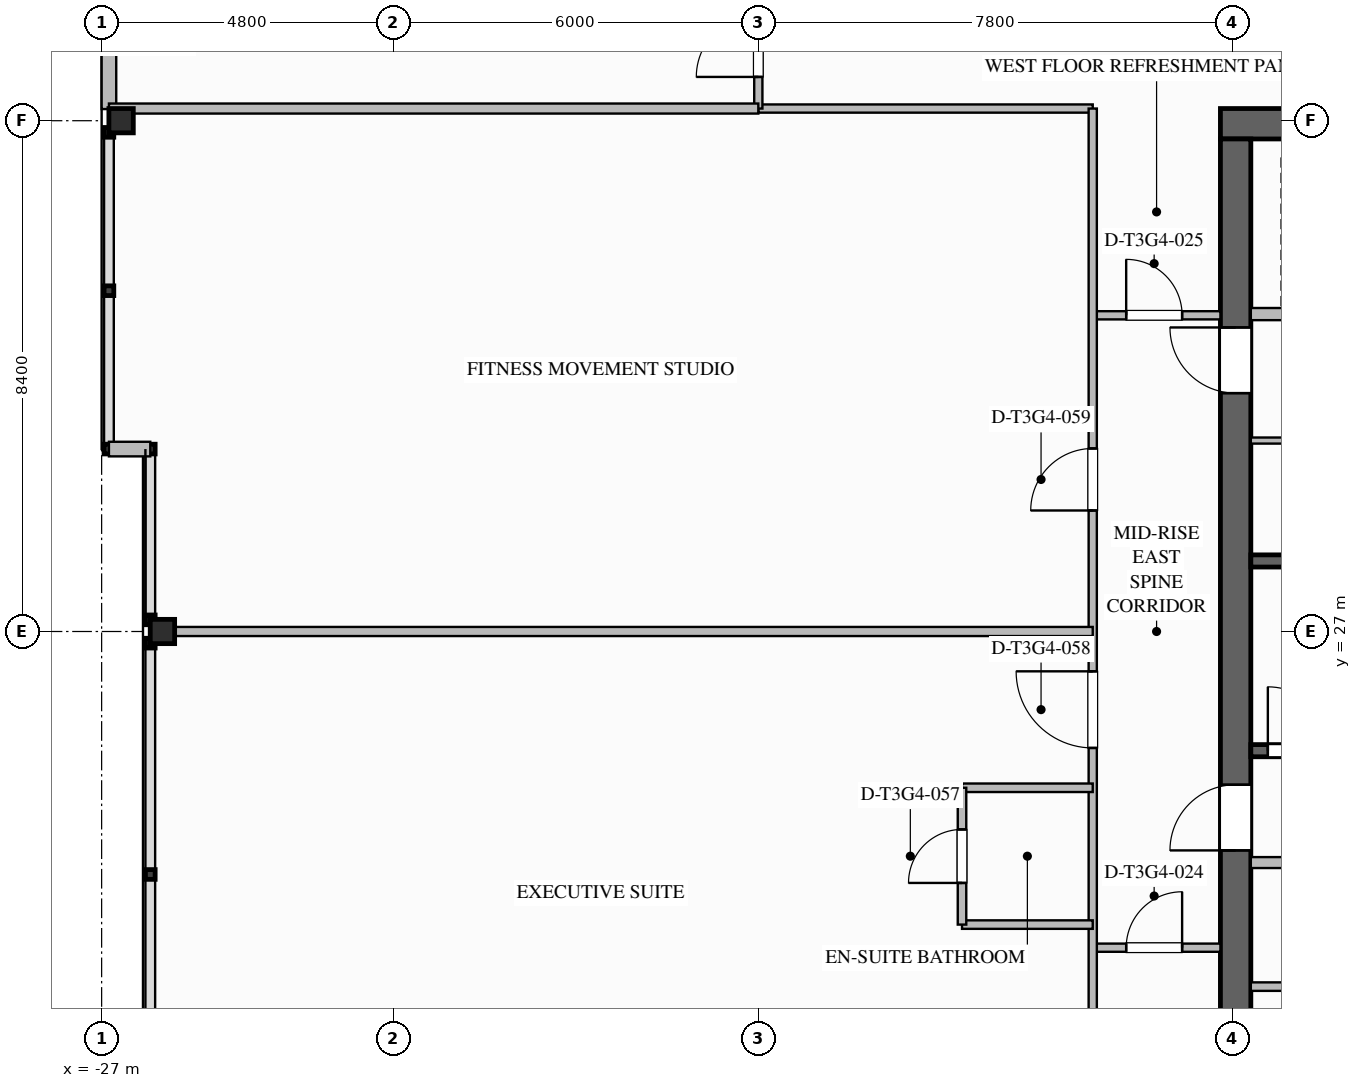
"""IFC4 building model, lengths in metres.
Left out: names, types, materials, properties, quantities, classifications, styles, units other than length and angle.
Written with IfcOpenShell. Run it as: python <this file> out.ifc"""

import sys

from ifc_helpers import new_model, si_unit, direction, frame, frame_2d, origin, origin_2d, place, context, subcontext, project, spatial, rectangle, i_section, extrude, element, fill, save


model = new_model("IFC4")
c1 = context("Model", 3, precision=1e-05, world=origin(), true_north=direction((0.0, 1.0)))
c2 = subcontext(c1, "Body", "Model", "MODEL_VIEW")
j1 = project(units=[si_unit("LENGTHUNIT", "METRE"), si_unit("PLANEANGLEUNIT", "RADIAN")], contexts=[c1])
p1 = place(None, origin())
s1 = spatial("IfcSite", under=j1, at=p1, CompositionType="ELEMENT")
p2 = place(p1, origin())
s2 = spatial("IfcBuilding", under=s1, at=p2, CompositionType="ELEMENT")
p3 = place(p2, frame((0.0, 0.0, 182.35)))
s3 = spatial("IfcBuildingStorey", under=s2, at=p3, CompositionType="ELEMENT", Elevation=182.35)
p4 = place(p3, frame((-8.6, 35.35, 0.0), z_axis=(0.0, 0.0, 1.0), x_axis=(1.0, 0.0, 0.0)))
e1 = element("IfcWall", 1, at=p4, inside=s3, PredefinedType="SHEAR", context=c2, shape_type="SweptSolid", body=[
    extrude(rectangle(XDim=17.2, YDim=0.5, at=frame_2d((8.6, 0.0))), origin(), (0.0, 0.0, 1.0), 3.55),
])
p5 = place(p3, frame((-8.35, 18.9, 0.0), z_axis=(0.0, 0.0, 1.0), x_axis=(0.0, 1.0, 0.0)))
e2 = element("IfcWall", 2, at=p5, inside=s3, PredefinedType="SHEAR", context=c2, shape_type="SweptSolid", body=[
    extrude(rectangle(XDim=16.2, YDim=0.5, at=frame_2d((8.1, 0.0))), origin(), (0.0, 0.0, 1.0), 3.55),
])
p6 = place(p5, frame((12.02, 0.0, 0.0)))
e3 = element("IfcOpeningElement", 3, at=p6, cuts=e2, PredefinedType="OPENING", context=c2, shape_type="SweptSolid", body=[
    extrude(rectangle(XDim=1.08, YDim=2.04, at=frame_2d((0.54, 1.02))), frame((0.0, 0.26, 0.0), z_axis=(0.0, -1.0, 0.0), x_axis=(1.0, 0.0, 0.0)), (0.0, 0.0, 1.0), 0.52),
])
p7 = place(p5, frame((4.5, 0.0, 0.0)))
e4 = element("IfcOpeningElement", 4, at=p7, cuts=e2, PredefinedType="OPENING", context=c2, shape_type="SweptSolid", body=[
    extrude(rectangle(XDim=1.08, YDim=2.04, at=frame_2d((0.54, 1.02))), frame((0.0, 0.26, 0.0), z_axis=(0.0, -1.0, 0.0), x_axis=(1.0, 0.0, 0.0)), (0.0, 0.0, 1.0), 0.52),
])
for number, where, z_axis, x_axis in (
    (5, (-26.0, 27.0, 0.0), (0.0, 0.0, 1.0), (1.0, 0.0, 0.0)),
    (6, (-26.68, 35.4, 0.0), (0.0, 0.0, 1.0), (1.0, 0.0, 0.0)),
):
    element("IfcColumn", number, at=place(p3, frame(where, z_axis=z_axis, x_axis=x_axis)), inside=s3, PredefinedType="COLUMN", context=c2, shape_type="SweptSolid", body=[
        extrude(i_section(OverallWidth=0.401, OverallDepth=0.399, WebThickness=0.025, FlangeThickness=0.04, FilletRadius=0.025, at=origin_2d()), origin(), (0.0, 0.0, 1.0), 3.547),
    ])
p8 = place(p3, frame((-26.88, 35.592, 0.0), z_axis=(0.0, 0.0, 1.0), x_axis=(0.0, 1.0, 0.0)))
e7 = element("IfcWall", 7, at=p8, inside=s3, PredefinedType="STANDARD", context=c2, shape_type="SweptSolid", body=[
    extrude(rectangle(XDim=7.417, YDim=0.24, at=frame_2d((3.708, 0.0))), origin(), (0.0, 0.0, 1.0), 2.753),
])
p9 = place(p8, frame((4.608, 0.0, 0.0)))
e8 = element("IfcOpeningElement", 8, at=p9, cuts=e7, PredefinedType="OPENING", context=c2, shape_type="SweptSolid", body=[
    extrude(rectangle(XDim=1.0, YDim=2.2, at=frame_2d((0.5, 1.1))), frame((0.0, 0.13, 0.0), z_axis=(0.0, -1.0, 0.0), x_axis=(1.0, 0.0, 0.0)), (0.0, 0.0, 1.0), 0.26),
])
p10 = place(p8, frame((1.58, 0.0, 0.75)))
e9 = element("IfcOpeningElement", 9, at=p10, cuts=e7, PredefinedType="OPENING", context=c2, shape_type="SweptSolid", body=[
    extrude(rectangle(XDim=1.8, YDim=1.903, at=frame_2d((0.9, 0.952))), frame((0.0, 0.13, 0.0), z_axis=(0.0, -1.0, 0.0), x_axis=(1.0, 0.0, 0.0)), (0.0, 0.0, 1.0), 0.26),
])
p11 = place(p3, frame((-26.2, 30.0, 0.0), z_axis=(0.0, 0.0, 1.0), x_axis=(-1.0, 0.0, 0.0)))
e10 = element("IfcWall", 10, at=p11, inside=s3, PredefinedType="STANDARD", context=c2, shape_type="SweptSolid", body=[
    extrude(rectangle(XDim=0.68, YDim=0.24, at=frame_2d((0.34, 0.0))), origin(), (0.0, 0.0, 1.0), 3.29),
])
p12 = place(p3, frame((-8.1, 25.04, 0.0), z_axis=(0.0, 0.0, 1.0), x_axis=(1.0, 0.0, 0.0)))
e11 = element("IfcWall", 11, at=p12, inside=s3, PredefinedType="SOLIDWALL", context=c2, shape_type="SweptSolid", body=[
    extrude(rectangle(XDim=8.1, YDim=0.2, at=frame_2d((4.05, 0.0))), origin(), (0.0, 0.0, 1.0), 3.29),
])
p13 = place(p12, frame((0.28, 0.0, 0.0)))
e12 = element("IfcOpeningElement", 12, at=p13, cuts=e11, PredefinedType="OPENING", context=c2, shape_type="SweptSolid", body=[
    extrude(rectangle(XDim=1.05, YDim=2.1, at=frame_2d((0.525, 1.05))), frame((0.0, 0.11, 0.0), z_axis=(0.0, -1.0, 0.0), x_axis=(1.0, 0.0, 0.0)), (0.0, 0.0, 1.0), 0.22),
])
p14 = place(p3, frame((-8.1, 28.16, 0.0), z_axis=(0.0, 0.0, 1.0), x_axis=(1.0, 0.0, 0.0)))
e13 = element("IfcWall", 13, at=p14, inside=s3, PredefinedType="SOLIDWALL", context=c2, shape_type="SweptSolid", body=[
    extrude(rectangle(XDim=8.1, YDim=0.2, at=frame_2d((4.05, 0.0))), origin(), (0.0, 0.0, 1.0), 3.29),
])
p15 = place(p3, frame((-8.1, 32.22, 0.0), z_axis=(0.0, 0.0, 1.0), x_axis=(1.0, 0.0, 0.0)))
e14 = element("IfcWall", 14, at=p15, inside=s3, PredefinedType="SOLIDWALL", context=c2, shape_type="SweptSolid", body=[
    extrude(rectangle(XDim=7.1, YDim=0.2, at=frame_2d((3.55, 0.0))), origin(), (0.0, 0.0, 1.0), 3.29),
])
p16 = place(p15, frame((0.95, 0.0, 0.0)))
e15 = element("IfcOpeningElement", 15, at=p16, cuts=e14, PredefinedType="OPENING", context=c2, shape_type="SweptSolid", body=[
    extrude(rectangle(XDim=1.1, YDim=2.2, at=frame_2d((0.55, 1.1))), frame((0.0, 0.11, 0.0), z_axis=(0.0, -1.0, 0.0), x_axis=(1.0, 0.0, 0.0)), (0.0, 0.0, 1.0), 0.22),
])
p17 = place(p15, frame((3.27, 0.0, 0.0)))
e16 = element("IfcOpeningElement", 16, at=p17, cuts=e14, PredefinedType="OPENING", context=c2, shape_type="SweptSolid", body=[
    extrude(rectangle(XDim=1.1, YDim=2.2, at=frame_2d((0.55, 1.1))), frame((0.0, 0.11, 0.0), z_axis=(0.0, -1.0, 0.0), x_axis=(1.0, 0.0, 0.0)), (0.0, 0.0, 1.0), 0.22),
])
p18 = place(p15, frame((5.59, 0.0, 0.0)))
e17 = element("IfcOpeningElement", 17, at=p18, cuts=e14, PredefinedType="OPENING", context=c2, shape_type="SweptSolid", body=[
    extrude(rectangle(XDim=1.1, YDim=2.2, at=frame_2d((0.55, 1.1))), frame((0.0, 0.11, 0.0), z_axis=(0.0, -1.0, 0.0), x_axis=(1.0, 0.0, 0.0)), (0.0, 0.0, 1.0), 0.22),
])
p19 = place(p3, frame((-8.1, 30.14, 0.0), z_axis=(0.0, 0.0, 1.0), x_axis=(1.0, 0.0, 0.0)))
e18 = element("IfcWall", 18, at=p19, inside=s3, PredefinedType="PARTITIONING", context=c2, shape_type="SweptSolid", body=[
    extrude(rectangle(XDim=7.1, YDim=0.1, at=frame_2d((3.55, 0.0))), origin(), (0.0, 0.0, 1.0), 3.29),
])
p20 = place(p19, frame((1.1, 0.0, 0.0)))
e19 = element("IfcOpeningElement", 19, at=p20, cuts=e18, PredefinedType="OPENING", context=c2, shape_type="SweptSolid", body=[
    extrude(rectangle(XDim=0.92, YDim=2.1, at=frame_2d((0.46, 1.05))), frame((0.0, 0.06, 0.0), z_axis=(0.0, -1.0, 0.0), x_axis=(1.0, 0.0, 0.0)), (0.0, 0.0, 1.0), 0.12),
])
p21 = place(p19, frame((4.6, 0.0, 0.0)))
e20 = element("IfcOpeningElement", 20, at=p21, cuts=e18, PredefinedType="OPENING", context=c2, shape_type="SweptSolid", body=[
    extrude(rectangle(XDim=0.92, YDim=2.1, at=frame_2d((0.46, 1.05))), frame((0.0, 0.06, 0.0), z_axis=(0.0, -1.0, 0.0), x_axis=(1.0, 0.0, 0.0)), (0.0, 0.0, 1.0), 0.12),
])
p22 = place(p3, frame((-8.1, 23.2, 0.0), z_axis=(0.0, 0.0, 1.0), x_axis=(1.0, 0.0, 0.0)))
e21 = element("IfcWall", 21, at=p22, inside=s3, PredefinedType="SOLIDWALL", context=c2, shape_type="SweptSolid", body=[
    extrude(rectangle(XDim=8.65, YDim=0.18, at=frame_2d((4.325, 0.0))), origin(), (0.0, 0.0, 1.0), 3.29),
])
p23 = place(p22, frame((1.4, 0.0, 0.0)))
e22 = element("IfcOpeningElement", 22, at=p23, cuts=e21, PredefinedType="OPENING", context=c2, shape_type="SweptSolid", body=[
    extrude(rectangle(XDim=1.0, YDim=2.1, at=frame_2d((0.5, 1.05))), frame((0.0, 0.1, 0.0), z_axis=(0.0, -1.0, 0.0), x_axis=(1.0, 0.0, 0.0)), (0.0, 0.0, 1.0), 0.2),
])
p24 = place(p22, frame((5.6, 0.0, 0.0)))
e23 = element("IfcOpeningElement", 23, at=p24, cuts=e21, PredefinedType="OPENING", context=c2, shape_type="SweptSolid", body=[
    extrude(rectangle(XDim=0.92, YDim=2.1, at=frame_2d((0.46, 1.05))), frame((0.0, 0.1, 0.0), z_axis=(0.0, -1.0, 0.0), x_axis=(1.0, 0.0, 0.0)), (0.0, 0.0, 1.0), 0.2),
])
p25 = place(p3, frame((-8.1, 21.16, 0.0), z_axis=(0.0, 0.0, 1.0), x_axis=(1.0, 0.0, 0.0)))
e24 = element("IfcWall", 24, at=p25, inside=s3, PredefinedType="PLUMBINGWALL", context=c2, shape_type="SweptSolid", body=[
    extrude(rectangle(XDim=8.65, YDim=0.14, at=frame_2d((4.325, 0.0))), origin(), (0.0, 0.0, 1.0), 3.29),
])
p26 = place(p25, frame((1.4, 0.0, 0.0)))
e25 = element("IfcOpeningElement", 25, at=p26, cuts=e24, PredefinedType="OPENING", context=c2, shape_type="SweptSolid", body=[
    extrude(rectangle(XDim=0.92, YDim=2.1, at=frame_2d((0.46, 1.05))), frame((0.0, 0.08, 0.0), z_axis=(0.0, -1.0, 0.0), x_axis=(1.0, 0.0, 0.0)), (0.0, 0.0, 1.0), 0.16),
])
p27 = place(p3, frame((-10.7, 21.8, 0.0), z_axis=(0.0, 0.0, 1.0), x_axis=(1.0, 0.0, 0.0)))
e26 = element("IfcWall", 26, at=p27, inside=s3, PredefinedType="PARTITIONING", context=c2, shape_type="SweptSolid", body=[
    extrude(rectangle(XDim=2.1, YDim=0.135, at=frame_2d((1.05, 0.0))), origin(), (0.0, 0.0, 1.0), 3.29),
])
p28 = place(p27, frame((0.55, 0.0, 0.0)))
e27 = element("IfcOpeningElement", 27, at=p28, cuts=e26, PredefinedType="OPENING", context=c2, shape_type="SweptSolid", body=[
    extrude(rectangle(XDim=0.92, YDim=2.1, at=frame_2d((0.46, 1.05))), frame((0.0, 0.077, 0.0), z_axis=(0.0, -1.0, 0.0), x_axis=(1.0, 0.0, 0.0)), (0.0, 0.0, 1.0), 0.155),
])
p29 = place(p3, frame((-10.7, 32.2, 0.0), z_axis=(0.0, 0.0, 1.0), x_axis=(1.0, 0.0, 0.0)))
e28 = element("IfcWall", 28, at=p29, inside=s3, PredefinedType="PARTITIONING", context=c2, shape_type="SweptSolid", body=[
    extrude(rectangle(XDim=2.1, YDim=0.135, at=frame_2d((1.05, 0.0))), origin(), (0.0, 0.0, 1.0), 3.29),
])
p30 = place(p29, frame((0.55, 0.0, 0.0)))
e29 = element("IfcOpeningElement", 29, at=p30, cuts=e28, PredefinedType="OPENING", context=c2, shape_type="SweptSolid", body=[
    extrude(rectangle(XDim=0.92, YDim=2.1, at=frame_2d((0.46, 1.05))), frame((0.0, 0.077, 0.0), z_axis=(0.0, -1.0, 0.0), x_axis=(1.0, 0.0, 0.0)), (0.0, 0.0, 1.0), 0.155),
])
p31 = place(p3, frame((-16.2, 35.6, 0.0), z_axis=(0.0, 0.0, 1.0), x_axis=(1.0, 0.0, 0.0)))
e30 = element("IfcWall", 30, at=p31, inside=s3, PredefinedType="PARTITIONING", context=c2, shape_type="SweptSolid", body=[
    extrude(rectangle(XDim=5.5, YDim=0.135, at=frame_2d((2.75, 0.0))), origin(), (0.0, 0.0, 1.0), 2.667),
])
p32 = place(p3, frame((-10.7, 18.4, 0.0), z_axis=(0.0, 0.0, 1.0), x_axis=(0.0, 1.0, 0.0)))
e31 = element("IfcWall", 31, at=p32, inside=s3, PredefinedType="PARTITIONING", context=c2, shape_type="SweptSolid", body=[
    extrude(rectangle(XDim=17.2, YDim=0.135, at=frame_2d((8.6, 0.0))), origin(), (0.0, 0.0, 1.0), 3.29),
])
p33 = place(p32, frame((6.685, 0.0, 0.0)))
e32 = element("IfcOpeningElement", 32, at=p33, cuts=e31, PredefinedType="OPENING", context=c2, shape_type="SweptSolid", body=[
    extrude(rectangle(XDim=1.26, YDim=2.2, at=frame_2d((0.63, 1.1))), frame((0.0, 0.077, 0.0), z_axis=(0.0, -1.0, 0.0), x_axis=(1.0, 0.0, 0.0)), (0.0, 0.0, 1.0), 0.155),
])
p34 = place(p32, frame((10.59, 0.0, 0.0)))
e33 = element("IfcOpeningElement", 33, at=p34, cuts=e31, PredefinedType="OPENING", context=c2, shape_type="SweptSolid", body=[
    extrude(rectangle(XDim=1.02, YDim=2.15, at=frame_2d((0.51, 1.075))), frame((0.0, 0.077, 0.0), z_axis=(0.0, -1.0, 0.0), x_axis=(1.0, 0.0, 0.0)), (0.0, 0.0, 1.0), 0.155),
])
p35 = place(p3, frame((-16.2, 35.6, 0.0), z_axis=(0.0, 0.0, 1.0), x_axis=(0.0, 1.0, 0.0)))
e34 = element("IfcWall", 34, at=p35, inside=s3, PredefinedType="PARTITIONING", context=c2, shape_type="SweptSolid", body=[
    extrude(rectangle(XDim=2.95, YDim=0.135, at=frame_2d((1.475, 0.0))), origin(), (0.0, 0.0, 1.0), 2.579),
])
p36 = place(p35, frame((0.52, 0.0, 0.0)))
e35 = element("IfcOpeningElement", 35, at=p36, cuts=e34, PredefinedType="OPENING", context=c2, shape_type="SweptSolid", body=[
    extrude(rectangle(XDim=1.02, YDim=2.15, at=frame_2d((0.51, 1.075))), frame((0.0, 0.077, 0.0), z_axis=(0.0, -1.0, 0.0), x_axis=(1.0, 0.0, 0.0)), (0.0, 0.0, 1.0), 0.155),
])
p37 = place(p3, frame((-26.88, 35.6, 0.0), z_axis=(0.0, 0.0, 1.0), x_axis=(1.0, 0.0, 0.0)))
e36 = element("IfcWall", 36, at=p37, inside=s3, PredefinedType="PARTITIONING", context=c2, shape_type="SweptSolid", body=[
    extrude(rectangle(XDim=10.68, YDim=0.165, at=frame_2d((5.34, 0.0))), origin(), (0.0, 0.0, 1.0), 2.579),
])
p38 = place(p3, frame((-26.2, 27.0, 0.0), z_axis=(0.0, 0.0, 1.0), x_axis=(1.0, 0.0, 0.0)))
e37 = element("IfcWall", 37, at=p38, inside=s3, PredefinedType="PARTITIONING", context=c2, shape_type="SweptSolid", body=[
    extrude(rectangle(XDim=15.5, YDim=0.15, at=frame_2d((7.75, 0.0))), origin(), (0.0, 0.0, 1.0), 2.579),
])
for number, where, z_axis, x_axis in (
    (38, (-10.7, 22.18, 0.0), (0.0, 0.0, 1.0), (-1.0, 0.0, 0.0)),
    (39, (-10.7, 24.43, 0.0), (0.0, 0.0, 1.0), (-1.0, 0.0, 0.0)),
):
    element("IfcWall", number, at=place(p3, frame(where, z_axis=z_axis, x_axis=x_axis)), inside=s3, PredefinedType="PLUMBINGWALL", context=c2, shape_type="SweptSolid", body=[
        extrude(rectangle(XDim=2.15, YDim=0.14, at=frame_2d((1.075, 0.0))), origin(), (0.0, 0.0, 1.0), 3.29),
    ])
p39 = place(p3, frame((-12.85, 22.18, 0.0), z_axis=(0.0, 0.0, 1.0), x_axis=(0.0, 1.0, 0.0)))
e40 = element("IfcWall", 40, at=p39, inside=s3, PredefinedType="PLUMBINGWALL", context=c2, shape_type="SweptSolid", body=[
    extrude(rectangle(XDim=2.25, YDim=0.14, at=frame_2d((1.125, 0.0))), origin(), (0.0, 0.0, 1.0), 3.29),
])
p40 = place(p39, frame((0.685, 0.0, 0.0)))
e41 = element("IfcOpeningElement", 41, at=p40, cuts=e40, PredefinedType="OPENING", context=c2, shape_type="SweptSolid", body=[
    extrude(rectangle(XDim=0.88, YDim=2.1, at=frame_2d((0.44, 1.05))), frame((0.0, 0.08, 0.0), z_axis=(0.0, -1.0, 0.0), x_axis=(1.0, 0.0, 0.0)), (0.0, 0.0, 1.0), 0.16),
])
p41 = place(p13, origin())
e42 = element("IfcDoor", 42, at=p41, inside=s3, OperationType="SINGLE_SWING_LEFT", PredefinedType="DOOR", context=c2, shape_type="SweptSolid", body=[
    extrude(rectangle(XDim=1.05, YDim=2.1, at=frame_2d((0.525, 1.05))), frame((0.0, 0.025, 0.0), z_axis=(0.0, -1.0, 0.0), x_axis=(1.0, 0.0, 0.0)), (0.0, 0.0, 1.0), 0.05),
])
fill(e12, e42)
p42 = place(p6, origin())
e43 = element("IfcDoor", 43, at=p42, inside=s3, OperationType="SINGLE_SWING_RIGHT", PredefinedType="DOOR", context=c2, shape_type="SweptSolid", body=[
    extrude(rectangle(XDim=1.08, YDim=2.04, at=frame_2d((0.54, 1.02))), frame((0.0, 0.025, 0.0), z_axis=(0.0, -1.0, 0.0), x_axis=(1.0, 0.0, 0.0)), (0.0, 0.0, 1.0), 0.05),
])
fill(e3, e43)
p43 = place(p7, origin())
e44 = element("IfcDoor", 44, at=p43, inside=s3, OperationType="SINGLE_SWING_LEFT", PredefinedType="DOOR", context=c2, shape_type="SweptSolid", body=[
    extrude(rectangle(XDim=1.08, YDim=2.04, at=frame_2d((0.54, 1.02))), frame((0.0, 0.025, 0.0), z_axis=(0.0, -1.0, 0.0), x_axis=(1.0, 0.0, 0.0)), (0.0, 0.0, 1.0), 0.05),
])
fill(e4, e44)
p44 = place(p28, origin())
e45 = element("IfcDoor", 45, at=p44, inside=s3, OperationType="SINGLE_SWING_RIGHT", PredefinedType="DOOR", context=c2, shape_type="SweptSolid", body=[
    extrude(rectangle(XDim=0.92, YDim=2.1, at=frame_2d((0.46, 1.05))), frame((0.0, 0.025, 0.0), z_axis=(0.0, -1.0, 0.0), x_axis=(1.0, 0.0, 0.0)), (0.0, 0.0, 1.0), 0.05),
])
fill(e27, e45)
p45 = place(p30, origin())
e46 = element("IfcDoor", 46, at=p45, inside=s3, OperationType="SINGLE_SWING_LEFT", PredefinedType="DOOR", context=c2, shape_type="SweptSolid", body=[
    extrude(rectangle(XDim=0.92, YDim=2.1, at=frame_2d((0.46, 1.05))), frame((0.0, 0.025, 0.0), z_axis=(0.0, -1.0, 0.0), x_axis=(1.0, 0.0, 0.0)), (0.0, 0.0, 1.0), 0.05),
])
fill(e29, e46)
p46 = place(p36, origin())
e47 = element("IfcDoor", 47, at=p46, inside=s3, OperationType="SINGLE_SWING_LEFT", PredefinedType="DOOR", context=c2, shape_type="SweptSolid", body=[
    extrude(rectangle(XDim=1.02, YDim=2.15, at=frame_2d((0.51, 1.075))), frame((0.0, 0.025, 0.0), z_axis=(0.0, -1.0, 0.0), x_axis=(1.0, 0.0, 0.0)), (0.0, 0.0, 1.0), 0.05),
])
fill(e35, e47)
p47 = place(p40, origin())
e48 = element("IfcDoor", 48, at=p47, inside=s3, OperationType="SINGLE_SWING_LEFT", PredefinedType="DOOR", context=c2, shape_type="SweptSolid", body=[
    extrude(rectangle(XDim=0.88, YDim=2.1, at=frame_2d((0.44, 1.05))), frame((0.0, 0.025, 0.0), z_axis=(0.0, -1.0, 0.0), x_axis=(1.0, 0.0, 0.0)), (0.0, 0.0, 1.0), 0.05),
])
fill(e41, e48)
p48 = place(p33, origin())
e49 = element("IfcDoor", 49, at=p48, inside=s3, OperationType="SINGLE_SWING_RIGHT", PredefinedType="DOOR", context=c2, shape_type="SweptSolid", body=[
    extrude(rectangle(XDim=1.26, YDim=2.2, at=frame_2d((0.63, 1.1))), frame((0.0, 0.025, 0.0), z_axis=(0.0, -1.0, 0.0), x_axis=(1.0, 0.0, 0.0)), (0.0, 0.0, 1.0), 0.05),
])
fill(e32, e49)
p49 = place(p34, origin())
e50 = element("IfcDoor", 50, at=p49, inside=s3, OperationType="SINGLE_SWING_LEFT", PredefinedType="DOOR", context=c2, shape_type="SweptSolid", body=[
    extrude(rectangle(XDim=1.02, YDim=2.15, at=frame_2d((0.51, 1.075))), frame((0.0, 0.025, 0.0), z_axis=(0.0, -1.0, 0.0), x_axis=(1.0, 0.0, 0.0)), (0.0, 0.0, 1.0), 0.05),
])
fill(e33, e50)
save(model, sys.argv[1])
